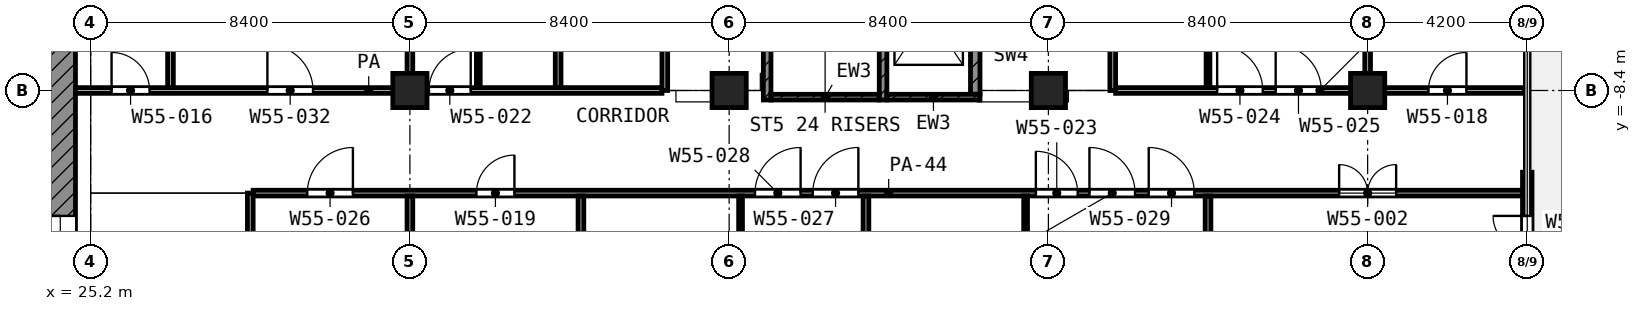
"""IFC4 building model, lengths in metres.
Left out: names, types, materials, properties, quantities, classifications, styles, units other than length and angle.
Written with IfcOpenShell. Run it as: python <this file> out.ifc"""

import sys

from ifc_helpers import new_model, si_unit, direction, frame, frame_2d, origin, origin_2d, place, context, subcontext, project, spatial, rectangle, extrude, element, fill, save


model = new_model("IFC4")
c1 = context("Model", 3, precision=1e-05, world=origin(), true_north=direction((0.0, 1.0)))
c2 = subcontext(c1, "Body", "Model", "MODEL_VIEW")
j1 = project(units=[si_unit("LENGTHUNIT", "METRE"), si_unit("PLANEANGLEUNIT", "RADIAN")], contexts=[c1])
p1 = place(None, origin())
s1 = spatial("IfcSite", under=j1, at=p1, CompositionType="ELEMENT")
p2 = place(p1, origin())
s2 = spatial("IfcBuilding", under=s1, at=p2, CompositionType="ELEMENT")
p3 = place(p2, frame((0.0, 0.0, 239.0)))
s3 = spatial("IfcBuildingStorey", under=s2, at=p3, CompositionType="ELEMENT", Elevation=239.0)
for number, where, z_axis, x_axis in (
    (1, (33.6, -8.4, 0.0), (0.0, 0.0, 1.0), (1.0, 0.0, 0.0)),
    (2, (42.0, -8.4, 0.0), (0.0, 0.0, 1.0), (1.0, 0.0, 0.0)),
    (3, (50.4, -8.4, 0.0), (0.0, 0.0, 1.0), (1.0, 0.0, 0.0)),
    (4, (58.8, -8.4, 0.0), (0.0, 0.0, 1.0), (1.0, 0.0, 0.0)),
):
    element("IfcColumn", number, at=place(p3, frame(where, z_axis=z_axis, x_axis=x_axis)), inside=s3, PredefinedType="COLUMN", context=c2, shape_type="SweptSolid", body=[
        extrude(rectangle(XDim=0.9, YDim=0.9, at=origin_2d()), origin(), (0.0, 0.0, 1.0), 4.2),
    ])
p4 = place(p3, frame((63.0, -14.65, 0.0), z_axis=(0.0, 0.0, 1.0), x_axis=(0.0, 1.0, 0.0)))
e5 = element("IfcWall", 5, at=p4, inside=s3, PredefinedType="SOLIDWALL", context=c2, shape_type="SweptSolid", body=[
    extrude(rectangle(XDim=4.1, YDim=0.25, at=frame_2d((2.05, 0.0))), origin(), (0.0, 0.0, 1.0), 2.58),
])
p5 = place(p4, frame((1.15, 0.0, 0.0)))
e6 = element("IfcOpeningElement", 6, at=p5, cuts=e5, PredefinedType="OPENING", context=c2, shape_type="SweptSolid", body=[
    extrude(rectangle(XDim=1.8, YDim=2.1, at=frame_2d((0.9, 1.05))), frame((0.0, 0.135, 0.0), z_axis=(0.0, -1.0, 0.0), x_axis=(1.0, 0.0, 0.0)), (0.0, 0.0, 1.0), 0.27),
])
p6 = place(p3, frame((24.4, -24.0, 0.0), z_axis=(0.0, 0.0, 1.0), x_axis=(0.0, 1.0, 0.0)))
e7 = element("IfcWall", 7, at=p6, inside=s3, PredefinedType="SHEAR", context=c2, shape_type="SweptSolid", body=[
    extrude(rectangle(XDim=18.6, YDim=0.8, at=frame_2d((9.3, 0.0))), origin(), (0.0, 0.0, 1.0), 3.6),
])
p7 = place(p6, frame((10.5, 0.0, 0.0)))
e8 = element("IfcOpeningElement", 8, at=p7, cuts=e7, PredefinedType="OPENING", context=c2, shape_type="SweptSolid", body=[
    extrude(rectangle(XDim=1.8, YDim=2.1, at=frame_2d((0.9, 1.05))), frame((0.0, 0.41, 0.0), z_axis=(0.0, -1.0, 0.0), x_axis=(1.0, 0.0, 0.0)), (0.0, 0.0, 1.0), 0.82),
])
p8 = place(p3, frame((43.0, -8.65, 0.0), z_axis=(0.0, 0.0, 1.0), x_axis=(0.0, 1.0, 0.0)))
e9 = element("IfcWall", 9, at=p8, inside=s3, PredefinedType="SHEAR", context=c2, shape_type="SweptSolid", body=[
    extrude(rectangle(XDim=8.35, YDim=0.2, at=frame_2d((4.175, 0.0))), origin(), (0.0, 0.0, 1.0), 3.6),
])
p9 = place(p8, frame((7.0, 0.0, 0.0)))
e10 = element("IfcOpeningElement", 10, at=p9, cuts=e9, PredefinedType="OPENING", context=c2, shape_type="SweptSolid", body=[
    extrude(rectangle(XDim=1.1, YDim=2.1, at=frame_2d((0.55, 1.05))), frame((0.0, 0.11, 0.0), z_axis=(0.0, -1.0, 0.0), x_axis=(1.0, 0.0, 0.0)), (0.0, 0.0, 1.0), 0.22),
])
p10 = place(p3, frame((46.05, -8.65, 0.0), z_axis=(0.0, 0.0, 1.0), x_axis=(0.0, 1.0, 0.0)))
e11 = element("IfcWall", 11, at=p10, inside=s3, PredefinedType="SHEAR", context=c2, shape_type="SweptSolid", body=[
    extrude(rectangle(XDim=8.35, YDim=0.2, at=frame_2d((4.175, 0.0))), origin(), (0.0, 0.0, 1.0), 3.6),
])
p11 = place(p10, frame((7.0, 0.0, 0.0)))
e12 = element("IfcOpeningElement", 12, at=p11, cuts=e11, PredefinedType="OPENING", context=c2, shape_type="SweptSolid", body=[
    extrude(rectangle(XDim=1.1, YDim=2.1, at=frame_2d((0.55, 1.05))), frame((0.0, 0.11, 0.0), z_axis=(0.0, -1.0, 0.0), x_axis=(1.0, 0.0, 0.0)), (0.0, 0.0, 1.0), 0.22),
])
p12 = place(p3, frame((43.1, -8.575, 0.0), z_axis=(0.0, 0.0, 1.0), x_axis=(1.0, 0.0, 0.0)))
e13 = element("IfcWall", 13, at=p12, inside=s3, PredefinedType="SHEAR", context=c2, shape_type="SweptSolid", body=[
    extrude(rectangle(XDim=2.85, YDim=0.15, at=frame_2d((1.425, 0.0))), origin(), (0.0, 0.0, 1.0), 3.6),
])
p13 = place(p3, frame((46.15, -8.575, 0.0), z_axis=(0.0, 0.0, 1.0), x_axis=(1.0, 0.0, 0.0)))
e14 = element("IfcWall", 14, at=p13, inside=s3, PredefinedType="SHEAR", context=c2, shape_type="SweptSolid", body=[
    extrude(rectangle(XDim=2.45, YDim=0.15, at=frame_2d((1.225, 0.0))), origin(), (0.0, 0.0, 1.0), 3.6),
])
p14 = place(p3, frame((48.475, -8.5, 0.0), z_axis=(0.0, 0.0, 1.0), x_axis=(0.0, 1.0, 0.0)))
e15 = element("IfcWall", 15, at=p14, inside=s3, PredefinedType="SHEAR", context=c2, shape_type="SweptSolid", body=[
    extrude(rectangle(XDim=3.475, YDim=0.25, at=frame_2d((1.738, 0.0))), origin(), (0.0, 0.0, 1.0), 3.6),
])
p15 = place(p3, frame((35.4, -8.325, 0.0), z_axis=(0.0, 0.0, 1.0), x_axis=(0.0, 1.0, 0.0)))
e16 = element("IfcWall", 16, at=p15, inside=s3, PredefinedType="PARTITIONING", context=c2, shape_type="SweptSolid", body=[
    extrude(rectangle(XDim=3.225, YDim=0.1, at=frame_2d((1.612, 0.0))), origin(), (0.0, 0.0, 1.0), 3.6),
])
p16 = place(p3, frame((42.3, -19.75, 0.0), z_axis=(0.0, 0.0, 1.0), x_axis=(0.0, 1.0, 0.0)))
e17 = element("IfcWall", 17, at=p16, inside=s3, PredefinedType="PARTITIONING", context=c2, shape_type="SweptSolid", body=[
    extrude(rectangle(XDim=8.575, YDim=0.1, at=frame_2d((4.288, 0.0))), origin(), (0.0, 0.0, 1.0), 3.6),
])
p17 = place(p16, frame((3.8, 0.0, 0.0)))
e18 = element("IfcOpeningElement", 18, at=p17, cuts=e17, PredefinedType="OPENING", context=c2, shape_type="SweptSolid", body=[
    extrude(rectangle(XDim=1.0, YDim=2.1, at=frame_2d((0.5, 1.05))), frame((0.0, 0.06, 0.0), z_axis=(0.0, -1.0, 0.0), x_axis=(1.0, 0.0, 0.0)), (0.0, 0.0, 1.0), 0.12),
])
p18 = place(p3, frame((49.8, -20.35, 0.0), z_axis=(0.0, 0.0, 1.0), x_axis=(0.0, 1.0, 0.0)))
e19 = element("IfcWall", 19, at=p18, inside=s3, PredefinedType="PARTITIONING", context=c2, shape_type="SweptSolid", body=[
    extrude(rectangle(XDim=9.175, YDim=0.1, at=frame_2d((4.587, 0.0))), origin(), (0.0, 0.0, 1.0), 3.6),
])
p19 = place(p18, frame((4.1, 0.0, 0.0)))
e20 = element("IfcOpeningElement", 20, at=p19, cuts=e19, PredefinedType="OPENING", context=c2, shape_type="SweptSolid", body=[
    extrude(rectangle(XDim=1.0, YDim=2.1, at=frame_2d((0.5, 1.05))), frame((0.0, 0.06, 0.0), z_axis=(0.0, -1.0, 0.0), x_axis=(1.0, 0.0, 0.0)), (0.0, 0.0, 1.0), 0.12),
])
p20 = place(p3, frame((54.6, -8.325, 0.0), z_axis=(0.0, 0.0, 1.0), x_axis=(0.0, 1.0, 0.0)))
e21 = element("IfcWall", 21, at=p20, inside=s3, PredefinedType="PARTITIONING", context=c2, shape_type="SweptSolid", body=[
    extrude(rectangle(XDim=3.475, YDim=0.1, at=frame_2d((1.737, 0.0))), origin(), (0.0, 0.0, 1.0), 3.6),
])
p21 = place(p20, frame((1.225, 0.0, 0.0)))
e22 = element("IfcOpeningElement", 22, at=p21, cuts=e21, PredefinedType="OPENING", context=c2, shape_type="SweptSolid", body=[
    extrude(rectangle(XDim=1.0, YDim=2.1, at=frame_2d((0.5, 1.05))), frame((0.0, 0.06, 0.0), z_axis=(0.0, -1.0, 0.0), x_axis=(1.0, 0.0, 0.0)), (0.0, 0.0, 1.0), 0.12),
])
p22 = place(p3, frame((29.475, -11.1, 0.0), z_axis=(0.0, 0.0, 1.0), x_axis=(1.0, 0.0, 0.0)))
e23 = element("IfcWall", 23, at=p22, inside=s3, PredefinedType="PARTITIONING", context=c2, shape_type="SweptSolid", body=[
    extrude(rectangle(XDim=33.445, YDim=0.15, at=frame_2d((16.722, 0.0))), origin(), (0.0, 0.0, 1.0), 2.7),
])
p23 = place(p22, frame((1.425, 0.0, 0.0)))
e24 = element("IfcOpeningElement", 24, at=p23, cuts=e23, PredefinedType="OPENING", context=c2, shape_type="SweptSolid", body=[
    extrude(rectangle(XDim=1.2, YDim=2.1, at=frame_2d((0.6, 1.05))), frame((0.0, 0.085, 0.0), z_axis=(0.0, -1.0, 0.0), x_axis=(1.0, 0.0, 0.0)), (0.0, 0.0, 1.0), 0.17),
])
p24 = place(p22, frame((5.875, 0.0, 0.0)))
e25 = element("IfcOpeningElement", 25, at=p24, cuts=e23, PredefinedType="OPENING", context=c2, shape_type="SweptSolid", body=[
    extrude(rectangle(XDim=1.0, YDim=2.1, at=frame_2d((0.5, 1.05))), frame((0.0, 0.085, 0.0), z_axis=(0.0, -1.0, 0.0), x_axis=(1.0, 0.0, 0.0)), (0.0, 0.0, 1.0), 0.17),
])
p25 = place(p22, frame((14.725, 0.0, 0.0)))
e26 = element("IfcOpeningElement", 26, at=p25, cuts=e23, PredefinedType="OPENING", context=c2, shape_type="SweptSolid", body=[
    extrude(rectangle(XDim=1.2, YDim=2.1, at=frame_2d((0.6, 1.05))), frame((0.0, 0.085, 0.0), z_axis=(0.0, -1.0, 0.0), x_axis=(1.0, 0.0, 0.0)), (0.0, 0.0, 1.0), 0.17),
])
p26 = place(p22, frame((13.205, 0.0, 0.0)))
e27 = element("IfcOpeningElement", 27, at=p26, cuts=e23, PredefinedType="OPENING", context=c2, shape_type="SweptSolid", body=[
    extrude(rectangle(XDim=1.2, YDim=2.1, at=frame_2d((0.6, 1.05))), frame((0.0, 0.085, 0.0), z_axis=(0.0, -1.0, 0.0), x_axis=(1.0, 0.0, 0.0)), (0.0, 0.0, 1.0), 0.17),
])
p27 = place(p22, frame((23.565, 0.0, 0.0)))
e28 = element("IfcOpeningElement", 28, at=p27, cuts=e23, PredefinedType="OPENING", context=c2, shape_type="SweptSolid", body=[
    extrude(rectangle(XDim=1.2, YDim=2.1, at=frame_2d((0.6, 1.05))), frame((0.0, 0.085, 0.0), z_axis=(0.0, -1.0, 0.0), x_axis=(1.0, 0.0, 0.0)), (0.0, 0.0, 1.0), 0.17),
])
p28 = place(p22, frame((22.005, 0.0, 0.0)))
e29 = element("IfcOpeningElement", 29, at=p28, cuts=e23, PredefinedType="OPENING", context=c2, shape_type="SweptSolid", body=[
    extrude(rectangle(XDim=1.2, YDim=2.1, at=frame_2d((0.6, 1.05))), frame((0.0, 0.085, 0.0), z_axis=(0.0, -1.0, 0.0), x_axis=(1.0, 0.0, 0.0)), (0.0, 0.0, 1.0), 0.17),
])
p29 = place(p22, frame((20.595, 0.0, 0.0)))
e30 = element("IfcOpeningElement", 30, at=p29, cuts=e23, PredefinedType="OPENING", context=c2, shape_type="SweptSolid", body=[
    extrude(rectangle(XDim=1.1, YDim=2.1, at=frame_2d((0.55, 1.05))), frame((0.0, 0.085, 0.0), z_axis=(0.0, -1.0, 0.0), x_axis=(1.0, 0.0, 0.0)), (0.0, 0.0, 1.0), 0.17),
])
p30 = place(p22, frame((28.575, 0.0, 0.0)))
e31 = element("IfcOpeningElement", 31, at=p30, cuts=e23, PredefinedType="OPENING", context=c2, shape_type="SweptSolid", body=[
    extrude(rectangle(XDim=1.5, YDim=2.1, at=frame_2d((0.75, 1.05))), frame((0.0, 0.085, 0.0), z_axis=(0.0, -1.0, 0.0), x_axis=(1.0, 0.0, 0.0)), (0.0, 0.0, 1.0), 0.17),
])
p31 = place(p3, frame((24.8, -8.4, 0.0), z_axis=(0.0, 0.0, 1.0), x_axis=(1.0, 0.0, 0.0)))
e32 = element("IfcWall", 32, at=p31, inside=s3, PredefinedType="PARTITIONING", context=c2, shape_type="SweptSolid", body=[
    extrude(rectangle(XDim=15.432, YDim=0.15, at=frame_2d((7.716, 0.0))), origin(), (0.0, 0.0, 1.0), 3.6),
])
p32 = place(p31, frame((9.3, 0.0, 0.0)))
e33 = element("IfcOpeningElement", 33, at=p32, cuts=e32, PredefinedType="OPENING", context=c2, shape_type="SweptSolid", body=[
    extrude(rectangle(XDim=1.1, YDim=2.1, at=frame_2d((0.55, 1.05))), frame((0.0, 0.085, 0.0), z_axis=(0.0, -1.0, 0.0), x_axis=(1.0, 0.0, 0.0)), (0.0, 0.0, 1.0), 0.17),
])
p33 = place(p31, frame((0.95, 0.0, 0.0)))
e34 = element("IfcOpeningElement", 34, at=p33, cuts=e32, PredefinedType="OPENING", context=c2, shape_type="SweptSolid", body=[
    extrude(rectangle(XDim=1.0, YDim=2.1, at=frame_2d((0.5, 1.05))), frame((0.0, 0.085, 0.0), z_axis=(0.0, -1.0, 0.0), x_axis=(1.0, 0.0, 0.0)), (0.0, 0.0, 1.0), 0.17),
])
p34 = place(p31, frame((5.05, 0.0, 0.0)))
e35 = element("IfcOpeningElement", 35, at=p34, cuts=e32, PredefinedType="OPENING", context=c2, shape_type="SweptSolid", body=[
    extrude(rectangle(XDim=1.2, YDim=2.1, at=frame_2d((0.6, 1.05))), frame((0.0, 0.085, 0.0), z_axis=(0.0, -1.0, 0.0), x_axis=(1.0, 0.0, 0.0)), (0.0, 0.0, 1.0), 0.17),
])
p35 = place(p3, frame((52.168, -8.4, 0.0), z_axis=(0.0, 0.0, 1.0), x_axis=(1.0, 0.0, 0.0)))
e36 = element("IfcWall", 36, at=p35, inside=s3, PredefinedType="PARTITIONING", context=c2, shape_type="SweptSolid", body=[
    extrude(rectangle(XDim=10.752, YDim=0.15, at=frame_2d((5.376, 0.0))), origin(), (0.0, 0.0, 1.0), 2.7),
])
p36 = place(p35, frame((2.672, 0.0, 0.0)))
e37 = element("IfcOpeningElement", 37, at=p36, cuts=e36, PredefinedType="OPENING", context=c2, shape_type="SweptSolid", body=[
    extrude(rectangle(XDim=1.2, YDim=2.1, at=frame_2d((0.6, 1.05))), frame((0.0, 0.085, 0.0), z_axis=(0.0, -1.0, 0.0), x_axis=(1.0, 0.0, 0.0)), (0.0, 0.0, 1.0), 0.17),
])
p37 = place(p35, frame((4.212, 0.0, 0.0)))
e38 = element("IfcOpeningElement", 38, at=p37, cuts=e36, PredefinedType="OPENING", context=c2, shape_type="SweptSolid", body=[
    extrude(rectangle(XDim=1.2, YDim=2.1, at=frame_2d((0.6, 1.05))), frame((0.0, 0.085, 0.0), z_axis=(0.0, -1.0, 0.0), x_axis=(1.0, 0.0, 0.0)), (0.0, 0.0, 1.0), 0.17),
])
p38 = place(p35, frame((8.232, 0.0, 0.0)))
e39 = element("IfcOpeningElement", 39, at=p38, cuts=e36, PredefinedType="OPENING", context=c2, shape_type="SweptSolid", body=[
    extrude(rectangle(XDim=1.0, YDim=2.1, at=frame_2d((0.5, 1.05))), frame((0.0, 0.085, 0.0), z_axis=(0.0, -1.0, 0.0), x_axis=(1.0, 0.0, 0.0)), (0.0, 0.0, 1.0), 0.17),
])
p39 = place(p3, frame((27.3, -8.325, 0.0), z_axis=(0.0, 0.0, 1.0), x_axis=(0.0, 1.0, 0.0)))
e40 = element("IfcWall", 40, at=p39, inside=s3, PredefinedType="PARTITIONING", context=c2, shape_type="SweptSolid", body=[
    extrude(rectangle(XDim=8.245, YDim=0.15, at=frame_2d((4.123, 0.0))), origin(), (0.0, 0.0, 1.0), 3.6),
])
p40 = place(p3, frame((29.4, -25.2, 0.0), z_axis=(0.0, 0.0, 1.0), x_axis=(0.0, 1.0, 0.0)))
e41 = element("IfcWall", 41, at=p40, inside=s3, PredefinedType="PARTITIONING", context=c2, shape_type="SweptSolid", body=[
    extrude(rectangle(XDim=14.1, YDim=0.15, at=frame_2d((7.05, 0.0))), origin(), (0.0, 0.0, 1.0), 3.6),
])
p41 = place(p3, frame((33.6, -25.12, 0.0), z_axis=(0.0, 0.0, 1.0), x_axis=(0.0, 1.0, 0.0)))
e42 = element("IfcWall", 42, at=p41, inside=s3, PredefinedType="PARTITIONING", context=c2, shape_type="SweptSolid", body=[
    extrude(rectangle(XDim=13.945, YDim=0.15, at=frame_2d((6.973, 0.0))), origin(), (0.0, 0.0, 1.0), 3.6),
])
for number, where, z_axis, x_axis in (
    (43, (33.6, -8.325, 0.0), (0.0, 0.0, 1.0), (0.0, 1.0, 0.0)),
    (44, (37.5, -8.325, 0.0), (0.0, 0.0, 1.0), (0.0, 1.0, 0.0)),
):
    element("IfcWall", number, at=place(p3, frame(where, z_axis=z_axis, x_axis=x_axis)), inside=s3, PredefinedType="PARTITIONING", context=c2, shape_type="SweptSolid", body=[
        extrude(rectangle(XDim=8.245, YDim=0.15, at=frame_2d((4.123, 0.0))), origin(), (0.0, 0.0, 1.0), 3.6),
    ])
p42 = place(p3, frame((38.1, -25.12, 0.0), z_axis=(0.0, 0.0, 1.0), x_axis=(0.0, 1.0, 0.0)))
e45 = element("IfcWall", 45, at=p42, inside=s3, PredefinedType="PARTITIONING", context=c2, shape_type="SweptSolid", body=[
    extrude(rectangle(XDim=13.945, YDim=0.15, at=frame_2d((6.973, 0.0))), origin(), (0.0, 0.0, 1.0), 3.6),
])
p43 = place(p3, frame((40.307, -8.4, 0.0), z_axis=(0.0, 0.0, 1.0), x_axis=(0.0, 1.0, 0.0)))
e46 = element("IfcWall", 46, at=p43, inside=s3, PredefinedType="PARTITIONING", context=c2, shape_type="SweptSolid", body=[
    extrude(rectangle(XDim=8.048, YDim=0.15, at=frame_2d((4.024, 0.0))), origin(), (0.0, 0.0, 1.0), 3.6),
])
p44 = place(p43, frame((3.524, 0.0, 0.0)))
e47 = element("IfcOpeningElement", 47, at=p44, cuts=e46, PredefinedType="OPENING", context=c2, shape_type="SweptSolid", body=[
    extrude(rectangle(XDim=1.0, YDim=2.1, at=frame_2d((0.5, 1.05))), frame((0.0, 0.085, 0.0), z_axis=(0.0, -1.0, 0.0), x_axis=(1.0, 0.0, 0.0)), (0.0, 0.0, 1.0), 0.17),
])
p45 = place(p3, frame((45.6, -25.12, 0.0), z_axis=(0.0, 0.0, 1.0), x_axis=(0.0, 1.0, 0.0)))
e48 = element("IfcWall", 48, at=p45, inside=s3, PredefinedType="PARTITIONING", context=c2, shape_type="SweptSolid", body=[
    extrude(rectangle(XDim=13.945, YDim=0.15, at=frame_2d((6.973, 0.0))), origin(), (0.0, 0.0, 1.0), 3.6),
])
p46 = place(p3, frame((52.093, -8.4, 0.0), z_axis=(0.0, 0.0, 1.0), x_axis=(0.0, 1.0, 0.0)))
e49 = element("IfcWall", 49, at=p46, inside=s3, PredefinedType="PARTITIONING", context=c2, shape_type="SweptSolid", body=[
    extrude(rectangle(XDim=6.55, YDim=0.15, at=frame_2d((3.275, 0.0))), origin(), (0.0, 0.0, 1.0), 3.6),
])
p47 = place(p3, frame((54.6, -25.12, 0.0), z_axis=(0.0, 0.0, 1.0), x_axis=(0.0, 1.0, 0.0)))
e50 = element("IfcWall", 50, at=p47, inside=s3, PredefinedType="PARTITIONING", context=c2, shape_type="SweptSolid", body=[
    extrude(rectangle(XDim=13.945, YDim=0.15, at=frame_2d((6.973, 0.0))), origin(), (0.0, 0.0, 1.0), 3.6),
])
p48 = place(p3, frame((58.8, -8.325, 0.0), z_axis=(0.0, 0.0, 1.0), x_axis=(0.0, 1.0, 0.0)))
e51 = element("IfcWall", 51, at=p48, inside=s3, PredefinedType="PARTITIONING", context=c2, shape_type="SweptSolid", body=[
    extrude(rectangle(XDim=6.412, YDim=0.15, at=frame_2d((3.206, 0.0))), origin(), (0.0, 0.0, 1.0), 2.7),
])
p49 = place(p5, origin())
e52 = element("IfcDoor", 52, at=p49, inside=s3, OperationType="DOUBLE_DOOR_SINGLE_SWING", PredefinedType="DOOR", context=c2, shape_type="SweptSolid", body=[
    extrude(rectangle(XDim=1.8, YDim=2.1, at=frame_2d((0.9, 1.05))), frame((0.0, 0.025, 0.0), z_axis=(0.0, -1.0, 0.0), x_axis=(1.0, 0.0, 0.0)), (0.0, 0.0, 1.0), 0.05),
])
fill(e6, e52)
p50 = place(p7, origin())
e53 = element("IfcDoor", 53, at=p50, inside=s3, OperationType="DOUBLE_DOOR_SINGLE_SWING", PredefinedType="DOOR", context=c2, shape_type="SweptSolid", body=[
    extrude(rectangle(XDim=1.8, YDim=2.1, at=frame_2d((0.9, 1.05))), frame((0.0, 0.025, 0.0), z_axis=(0.0, -1.0, 0.0), x_axis=(1.0, 0.0, 0.0)), (0.0, 0.0, 1.0), 0.05),
])
fill(e8, e53)
p51 = place(p32, origin())
e54 = element("IfcDoor", 54, at=p51, inside=s3, OperationType="SINGLE_SWING_RIGHT", PredefinedType="DOOR", context=c2, shape_type="SweptSolid", body=[
    extrude(rectangle(XDim=1.1, YDim=2.1, at=frame_2d((0.55, 1.05))), frame((0.0, 0.025, 0.0), z_axis=(0.0, -1.0, 0.0), x_axis=(1.0, 0.0, 0.0)), (0.0, 0.0, 1.0), 0.05),
])
fill(e33, e54)
p52 = place(p36, origin())
e55 = element("IfcDoor", 55, at=p52, inside=s3, OperationType="SINGLE_SWING_LEFT", PredefinedType="DOOR", context=c2, shape_type="SweptSolid", body=[
    extrude(rectangle(XDim=1.2, YDim=2.1, at=frame_2d((0.6, 1.05))), frame((0.0, 0.025, 0.0), z_axis=(0.0, -1.0, 0.0), x_axis=(1.0, 0.0, 0.0)), (0.0, 0.0, 1.0), 0.05),
])
fill(e37, e55)
p53 = place(p37, origin())
e56 = element("IfcDoor", 56, at=p53, inside=s3, OperationType="SINGLE_SWING_LEFT", PredefinedType="DOOR", context=c2, shape_type="SweptSolid", body=[
    extrude(rectangle(XDim=1.2, YDim=2.1, at=frame_2d((0.6, 1.05))), frame((0.0, 0.025, 0.0), z_axis=(0.0, -1.0, 0.0), x_axis=(1.0, 0.0, 0.0)), (0.0, 0.0, 1.0), 0.05),
])
fill(e38, e56)
p54 = place(p38, origin())
e57 = element("IfcDoor", 57, at=p54, inside=s3, OperationType="SINGLE_SWING_RIGHT", PredefinedType="DOOR", context=c2, shape_type="SweptSolid", body=[
    extrude(rectangle(XDim=1.0, YDim=2.1, at=frame_2d((0.5, 1.05))), frame((0.0, 0.025, 0.0), z_axis=(0.0, -1.0, 0.0), x_axis=(1.0, 0.0, 0.0)), (0.0, 0.0, 1.0), 0.05),
])
fill(e39, e57)
p55 = place(p23, origin())
e58 = element("IfcDoor", 58, at=p55, inside=s3, OperationType="SINGLE_SWING_RIGHT", PredefinedType="DOOR", context=c2, shape_type="SweptSolid", body=[
    extrude(rectangle(XDim=1.2, YDim=2.1, at=frame_2d((0.6, 1.05))), frame((0.0, 0.025, 0.0), z_axis=(0.0, -1.0, 0.0), x_axis=(1.0, 0.0, 0.0)), (0.0, 0.0, 1.0), 0.05),
])
fill(e24, e58)
p56 = place(p24, origin())
e59 = element("IfcDoor", 59, at=p56, inside=s3, OperationType="SINGLE_SWING_RIGHT", PredefinedType="DOOR", context=c2, shape_type="SweptSolid", body=[
    extrude(rectangle(XDim=1.0, YDim=2.1, at=frame_2d((0.5, 1.05))), frame((0.0, 0.025, 0.0), z_axis=(0.0, -1.0, 0.0), x_axis=(1.0, 0.0, 0.0)), (0.0, 0.0, 1.0), 0.05),
])
fill(e25, e59)
p57 = place(p25, origin())
e60 = element("IfcDoor", 60, at=p57, inside=s3, OperationType="SINGLE_SWING_RIGHT", PredefinedType="DOOR", context=c2, shape_type="SweptSolid", body=[
    extrude(rectangle(XDim=1.2, YDim=2.1, at=frame_2d((0.6, 1.05))), frame((0.0, 0.025, 0.0), z_axis=(0.0, -1.0, 0.0), x_axis=(1.0, 0.0, 0.0)), (0.0, 0.0, 1.0), 0.05),
])
fill(e26, e60)
p58 = place(p26, origin())
e61 = element("IfcDoor", 61, at=p58, inside=s3, OperationType="SINGLE_SWING_RIGHT", PredefinedType="DOOR", context=c2, shape_type="SweptSolid", body=[
    extrude(rectangle(XDim=1.2, YDim=2.1, at=frame_2d((0.6, 1.05))), frame((0.0, 0.025, 0.0), z_axis=(0.0, -1.0, 0.0), x_axis=(1.0, 0.0, 0.0)), (0.0, 0.0, 1.0), 0.05),
])
fill(e27, e61)
p59 = place(p27, origin())
e62 = element("IfcDoor", 62, at=p59, inside=s3, OperationType="SINGLE_SWING_LEFT", PredefinedType="DOOR", context=c2, shape_type="SweptSolid", body=[
    extrude(rectangle(XDim=1.2, YDim=2.1, at=frame_2d((0.6, 1.05))), frame((0.0, 0.025, 0.0), z_axis=(0.0, -1.0, 0.0), x_axis=(1.0, 0.0, 0.0)), (0.0, 0.0, 1.0), 0.05),
])
fill(e28, e62)
p60 = place(p28, origin())
e63 = element("IfcDoor", 63, at=p60, inside=s3, OperationType="SINGLE_SWING_LEFT", PredefinedType="DOOR", context=c2, shape_type="SweptSolid", body=[
    extrude(rectangle(XDim=1.2, YDim=2.1, at=frame_2d((0.6, 1.05))), frame((0.0, 0.025, 0.0), z_axis=(0.0, -1.0, 0.0), x_axis=(1.0, 0.0, 0.0)), (0.0, 0.0, 1.0), 0.05),
])
fill(e29, e63)
p61 = place(p29, origin())
e64 = element("IfcDoor", 64, at=p61, inside=s3, OperationType="SINGLE_SWING_LEFT", PredefinedType="DOOR", context=c2, shape_type="SweptSolid", body=[
    extrude(rectangle(XDim=1.1, YDim=2.1, at=frame_2d((0.55, 1.05))), frame((0.0, 0.025, 0.0), z_axis=(0.0, -1.0, 0.0), x_axis=(1.0, 0.0, 0.0)), (0.0, 0.0, 1.0), 0.05),
])
fill(e30, e64)
p62 = place(p30, origin())
e65 = element("IfcDoor", 65, at=p62, inside=s3, OperationType="DOUBLE_DOOR_SINGLE_SWING", PredefinedType="DOOR", context=c2, shape_type="SweptSolid", body=[
    extrude(rectangle(XDim=1.5, YDim=2.1, at=frame_2d((0.75, 1.05))), frame((0.0, 0.025, 0.0), z_axis=(0.0, -1.0, 0.0), x_axis=(1.0, 0.0, 0.0)), (0.0, 0.0, 1.0), 0.05),
])
fill(e31, e65)
p63 = place(p33, origin())
e66 = element("IfcDoor", 66, at=p63, inside=s3, OperationType="SINGLE_SWING_LEFT", PredefinedType="DOOR", context=c2, shape_type="SweptSolid", body=[
    extrude(rectangle(XDim=1.0, YDim=2.1, at=frame_2d((0.5, 1.05))), frame((0.0, 0.025, 0.0), z_axis=(0.0, -1.0, 0.0), x_axis=(1.0, 0.0, 0.0)), (0.0, 0.0, 1.0), 0.05),
])
fill(e34, e66)
p64 = place(p34, origin())
e67 = element("IfcDoor", 67, at=p64, inside=s3, OperationType="SINGLE_SWING_LEFT", PredefinedType="DOOR", context=c2, shape_type="SweptSolid", body=[
    extrude(rectangle(XDim=1.2, YDim=2.1, at=frame_2d((0.6, 1.05))), frame((0.0, 0.025, 0.0), z_axis=(0.0, -1.0, 0.0), x_axis=(1.0, 0.0, 0.0)), (0.0, 0.0, 1.0), 0.05),
])
fill(e35, e67)
save(model, sys.argv[1])
